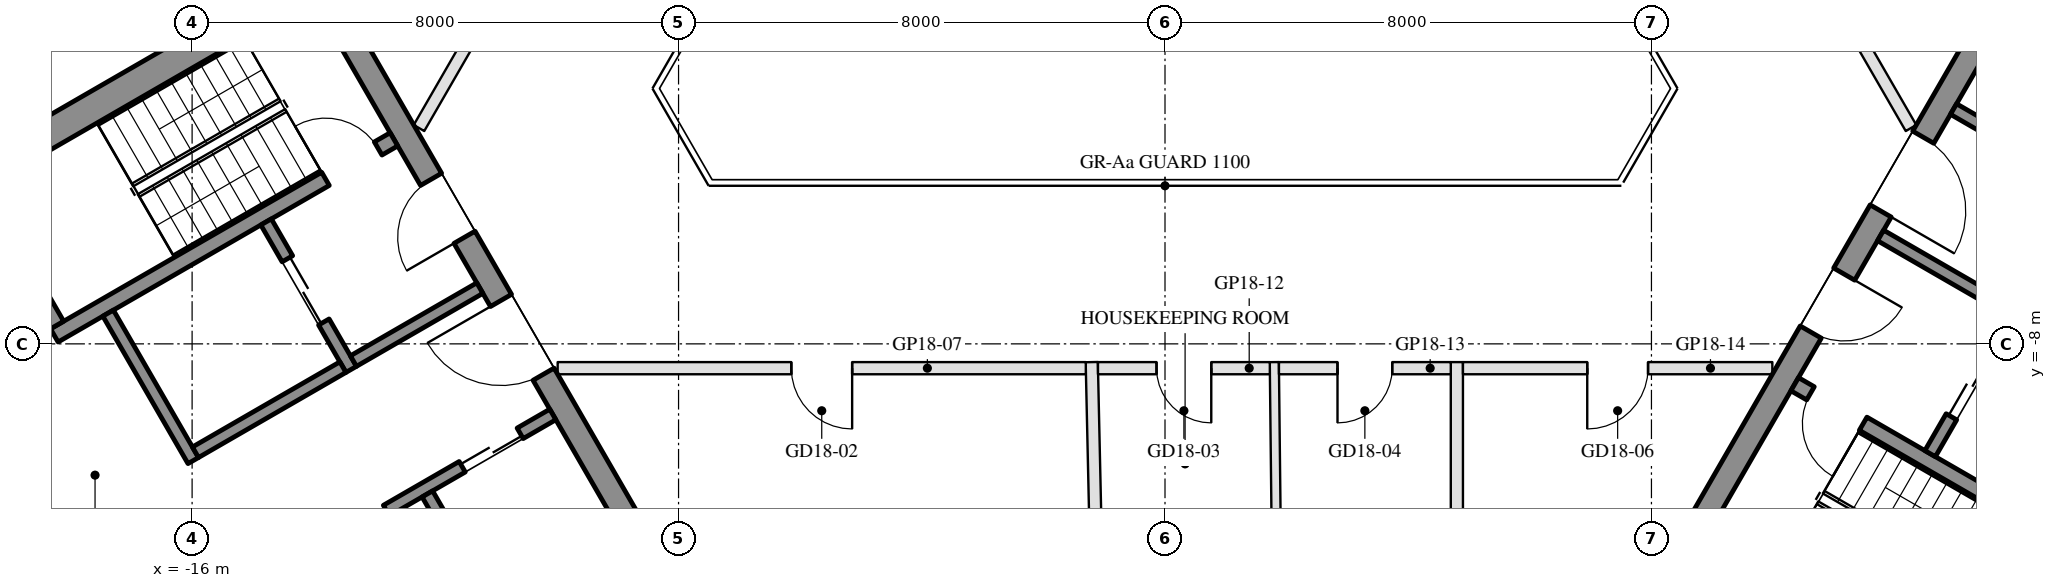
"""IFC4 building model, lengths in metres.
Left out: names, types, materials, properties, quantities, classifications, styles, units other than length and angle.
Written with IfcOpenShell. Run it as: python <this file> out.ifc"""

import sys

from ifc_helpers import new_model, si_unit, direction, frame, frame_2d, origin, place, context, subcontext, project, spatial, rectangle, extrude, element, fill, save


model = new_model("IFC4")
c1 = context("Model", 3, precision=1e-05, world=origin(), true_north=direction((0.0, 1.0)))
c2 = subcontext(c1, "Body", "Model", "MODEL_VIEW")
j1 = project(units=[si_unit("LENGTHUNIT", "METRE"), si_unit("PLANEANGLEUNIT", "RADIAN")], contexts=[c1])
p1 = place(None, origin())
s1 = spatial("IfcSite", under=j1, at=p1, CompositionType="ELEMENT")
p2 = place(p1, origin())
s2 = spatial("IfcBuilding", under=s1, at=p2, CompositionType="ELEMENT")
p3 = place(p2, frame((0.0, 0.0, 198.4)))
s3 = spatial("IfcBuildingStorey", under=s2, at=p3, CompositionType="ELEMENT", Elevation=198.4)
p4 = place(p3, frame((-13.797, -1.903, 0.0), z_axis=(0.0, 0.0, 1.0), x_axis=(-0.866025009528, -0.500000682871, 0.0)))
e1 = element("IfcWall", 1, at=p4, inside=s3, PredefinedType="SHEAR", context=c2, shape_type="SweptSolid", body=[
    extrude(rectangle(XDim=14.837, YDim=0.5, at=frame_2d((7.418, 0.0))), origin(), (0.0, 0.0, 1.0), 3.5),
])
p5 = place(p3, frame((-13.845, -2.22, 0.0), z_axis=(0.0, 0.0, 1.0), x_axis=(0.500004234368, -0.866022959057, 0.0)))
e2 = element("IfcWall", 2, at=p5, inside=s3, PredefinedType="SHEAR", context=c2, shape_type="SweptSolid", body=[
    extrude(rectangle(XDim=10.0, YDim=0.4, at=frame_2d((5.0, 0.0))), origin(), (0.0, 0.0, 1.0), 3.5),
])
p6 = place(p5, frame((3.55, 0.0, 0.0)))
e3 = element("IfcOpeningElement", 3, at=p6, cuts=e2, PredefinedType="OPENING", context=c2, shape_type="SweptSolid", body=[
    extrude(rectangle(XDim=1.1, YDim=2.1, at=frame_2d((0.55, 1.05))), frame((0.0, 0.21, 0.0), z_axis=(0.0, -1.0, 0.0), x_axis=(1.0, 0.0, 0.0)), (0.0, 0.0, 1.0), 0.42),
])
p7 = place(p5, frame((5.85, 0.0, 0.0)))
e4 = element("IfcOpeningElement", 4, at=p7, cuts=e2, PredefinedType="OPENING", context=c2, shape_type="SweptSolid", body=[
    extrude(rectangle(XDim=1.4, YDim=2.1, at=frame_2d((0.7, 1.05))), frame((0.0, 0.21, 0.0), z_axis=(0.0, -1.0, 0.0), x_axis=(1.0, 0.0, 0.0)), (0.0, 0.0, 1.0), 0.42),
])
p8 = place(p3, frame((-12.681, -4.636, 0.0), z_axis=(0.0, 0.0, 1.0), x_axis=(-0.866021702275, -0.500006411147, 0.0)))
e5 = element("IfcWall", 5, at=p8, inside=s3, PredefinedType="SHEAR", context=c2, shape_type="SweptSolid", body=[
    extrude(rectangle(XDim=6.45, YDim=0.25, at=frame_2d((3.225, 0.0))), origin(), (0.0, 0.0, 1.0), 3.5),
])
p9 = place(p8, frame((0.3, 0.0, 0.0)))
e6 = element("IfcOpeningElement", 6, at=p9, cuts=e5, PredefinedType="OPENING", context=c2, shape_type="SweptSolid", body=[
    extrude(rectangle(XDim=1.0, YDim=2.1, at=frame_2d((0.5, 1.05))), frame((0.0, 0.135, 0.0), z_axis=(0.0, -1.0, 0.0), x_axis=(1.0, 0.0, 0.0)), (0.0, 0.0, 1.0), 0.27),
])
p10 = place(p3, frame((-19.496, -5.482, 0.0), z_axis=(0.0, 0.0, 1.0), x_axis=(0.499990435942, -0.866030925526, 0.0)))
e7 = element("IfcWall", 7, at=p10, inside=s3, PredefinedType="SHEAR", context=c2, shape_type="SweptSolid", body=[
    extrude(rectangle(XDim=2.55, YDim=0.25, at=frame_2d((1.275, 0.0))), origin(), (0.0, 0.0, 1.0), 3.5),
])
p11 = place(p3, frame((-17.381, -7.495, 0.0), z_axis=(0.0, 0.0, 1.0), x_axis=(0.500011755427, -0.866018616679, 0.0)))
e8 = element("IfcWall", 8, at=p11, inside=s3, PredefinedType="SHEAR", context=c2, shape_type="SweptSolid", body=[
    extrude(rectangle(XDim=2.8, YDim=0.2, at=frame_2d((1.4, 0.0))), origin(), (0.0, 0.0, 1.0), 3.5),
])
p12 = place(p3, frame((-14.783, -5.995, 0.0), z_axis=(0.0, 0.0, 1.0), x_axis=(0.49994636267, -0.866056369097, 0.0)))
e9 = element("IfcWall", 9, at=p12, inside=s3, PredefinedType="SHEAR", context=c2, shape_type="SweptSolid", body=[
    extrude(rectangle(XDim=2.8, YDim=0.2, at=frame_2d((1.4, 0.0))), origin(), (0.0, 0.0, 1.0), 3.5),
])
p13 = place(p12, frame((0.7, 0.0, 0.0)))
e10 = element("IfcOpeningElement", 10, at=p13, cuts=e9, PredefinedType="OPENING", context=c2, shape_type="SweptSolid", body=[
    extrude(rectangle(XDim=1.2, YDim=2.1, at=frame_2d((0.6, 1.05))), frame((0.0, 0.11, 0.0), z_axis=(0.0, -1.0, 0.0), x_axis=(1.0, 0.0, 0.0)), (0.0, 0.0, 1.0), 0.22),
])
p14 = place(p3, frame((-13.52, -8.383, 0.0), z_axis=(0.0, 0.0, 1.0), x_axis=(-0.866034573852, -0.49998411664, 0.0)))
e11 = element("IfcWall", 11, at=p14, inside=s3, PredefinedType="SHEAR", context=c2, shape_type="SweptSolid", body=[
    extrude(rectangle(XDim=2.8, YDim=0.2, at=frame_2d((1.4, 0.0))), origin(), (0.0, 0.0, 1.0), 3.5),
])
p15 = place(p3, frame((-11.268, -7.083, 0.0), z_axis=(0.0, 0.0, 1.0), x_axis=(-0.866050077142, -0.499957262057, 0.0)))
e12 = element("IfcWall", 12, at=p15, inside=s3, PredefinedType="SHEAR", context=c2, shape_type="SweptSolid", body=[
    extrude(rectangle(XDim=2.4, YDim=0.2, at=frame_2d((1.2, 0.0))), origin(), (0.0, 0.0, 1.0), 3.5),
])
p16 = place(p3, frame((-10.068, -9.162, 0.0), z_axis=(0.0, 0.0, 1.0), x_axis=(-0.866032725843, -0.499987317609, 0.0)))
e13 = element("IfcWall", 13, at=p16, inside=s3, PredefinedType="SHEAR", context=c2, shape_type="SweptSolid", body=[
    extrude(rectangle(XDim=10.16, YDim=0.2, at=frame_2d((5.08, 0.0))), origin(), (0.0, 0.0, 1.0), 3.5),
])
p17 = place(p16, frame((0.62, 0.0, 0.0)))
e14 = element("IfcOpeningElement", 14, at=p17, cuts=e13, PredefinedType="OPENING", context=c2, shape_type="SweptSolid", body=[
    extrude(rectangle(XDim=1.1, YDim=2.1, at=frame_2d((0.55, 1.05))), frame((0.0, 0.11, 0.0), z_axis=(0.0, -1.0, 0.0), x_axis=(1.0, 0.0, 0.0)), (0.0, 0.0, 1.0), 0.22),
])
p18 = place(p16, frame((3.16, 0.0, 0.0)))
e15 = element("IfcOpeningElement", 15, at=p18, cuts=e13, PredefinedType="OPENING", context=c2, shape_type="SweptSolid", body=[
    extrude(rectangle(XDim=1.1, YDim=2.1, at=frame_2d((0.55, 1.05))), frame((0.0, 0.11, 0.0), z_axis=(0.0, -1.0, 0.0), x_axis=(1.0, 0.0, 0.0)), (0.0, 0.0, 1.0), 0.22),
])
p19 = place(p16, frame((5.7, 0.0, 0.0)))
e16 = element("IfcOpeningElement", 16, at=p19, cuts=e13, PredefinedType="OPENING", context=c2, shape_type="SweptSolid", body=[
    extrude(rectangle(XDim=1.1, YDim=2.1, at=frame_2d((0.55, 1.05))), frame((0.0, 0.11, 0.0), z_axis=(0.0, -1.0, 0.0), x_axis=(1.0, 0.0, 0.0)), (0.0, 0.0, 1.0), 0.22),
])
p20 = place(p16, frame((8.24, 0.0, 0.0)))
e17 = element("IfcOpeningElement", 17, at=p20, cuts=e13, PredefinedType="OPENING", context=c2, shape_type="SweptSolid", body=[
    extrude(rectangle(XDim=1.1, YDim=2.1, at=frame_2d((0.55, 1.05))), frame((0.0, 0.11, 0.0), z_axis=(0.0, -1.0, 0.0), x_axis=(1.0, 0.0, 0.0)), (0.0, 0.0, 1.0), 0.22),
])
p21 = place(p3, frame((-12.131, -10.468, 0.0), z_axis=(0.0, 0.0, 1.0), x_axis=(0.499972520799, -0.866041268327, 0.0)))
e18 = element("IfcWall", 18, at=p21, inside=s3, PredefinedType="SHEAR", context=c2, shape_type="SweptSolid", body=[
    extrude(rectangle(XDim=2.0, YDim=0.2, at=frame_2d((1.0, 0.0))), origin(), (0.0, 0.0, 1.0), 3.5),
])
p22 = place(p3, frame((-21.076, -6.395, 0.0), z_axis=(0.0, 0.0, 1.0), x_axis=(0.50001468107, -0.866016927499, 0.0)))
e19 = element("IfcWall", 19, at=p22, inside=s3, PredefinedType="PARTITIONING", context=c2, shape_type="SweptSolid", body=[
    extrude(rectangle(XDim=5.4, YDim=0.2, at=frame_2d((2.7, 0.0))), origin(), (0.0, 0.0, 1.0), 3.5),
])
p23 = place(p22, frame((3.05, 0.0, 0.0)))
e20 = element("IfcOpeningElement", 20, at=p23, cuts=e19, PredefinedType="OPENING", context=c2, shape_type="SweptSolid", body=[
    extrude(rectangle(XDim=0.9, YDim=2.1, at=frame_2d((0.45, 1.05))), frame((0.0, 0.11, 0.0), z_axis=(0.0, -1.0, 0.0), x_axis=(1.0, 0.0, 0.0)), (0.0, 0.0, 1.0), 0.22),
])
p24 = place(p3, frame((8.845, -10.88, 0.0), z_axis=(0.0, 0.0, 1.0), x_axis=(0.500004234368, 0.866022959057, 0.0)))
e21 = element("IfcWall", 21, at=p24, inside=s3, PredefinedType="SHEAR", context=c2, shape_type="SweptSolid", body=[
    extrude(rectangle(XDim=10.0, YDim=0.4, at=frame_2d((5.0, 0.0))), origin(), (0.0, 0.0, 1.0), 3.5),
])
p25 = place(p24, frame((3.55, 0.0, 0.0)))
e22 = element("IfcOpeningElement", 22, at=p25, cuts=e21, PredefinedType="OPENING", context=c2, shape_type="SweptSolid", body=[
    extrude(rectangle(XDim=1.1, YDim=2.1, at=frame_2d((0.55, 1.05))), frame((0.0, 0.21, 0.0), z_axis=(0.0, -1.0, 0.0), x_axis=(1.0, 0.0, 0.0)), (0.0, 0.0, 1.0), 0.42),
])
p26 = place(p24, frame((5.85, 0.0, 0.0)))
e23 = element("IfcOpeningElement", 23, at=p26, cuts=e21, PredefinedType="OPENING", context=c2, shape_type="SweptSolid", body=[
    extrude(rectangle(XDim=1.4, YDim=2.1, at=frame_2d((0.7, 1.05))), frame((0.0, 0.21, 0.0), z_axis=(0.0, -1.0, 0.0), x_axis=(1.0, 0.0, 0.0)), (0.0, 0.0, 1.0), 0.42),
])
p27 = place(p3, frame((10.356, -8.664, 0.0), z_axis=(0.0, 0.0, 1.0), x_axis=(0.866028629588, -0.499994412703, 0.0)))
e24 = element("IfcWall", 24, at=p27, inside=s3, PredefinedType="SHEAR", context=c2, shape_type="SweptSolid", body=[
    extrude(rectangle(XDim=6.45, YDim=0.25, at=frame_2d((3.225, 0.0))), origin(), (0.0, 0.0, 1.0), 3.5),
])
p28 = place(p27, frame((0.3, 0.0, 0.0)))
e25 = element("IfcOpeningElement", 25, at=p28, cuts=e24, PredefinedType="OPENING", context=c2, shape_type="SweptSolid", body=[
    extrude(rectangle(XDim=1.0, YDim=2.1, at=frame_2d((0.5, 1.05))), frame((0.0, 0.135, 0.0), z_axis=(0.0, -1.0, 0.0), x_axis=(1.0, 0.0, 0.0)), (0.0, 0.0, 1.0), 0.27),
])
p29 = place(p3, frame((12.583, -9.805, 0.0), z_axis=(0.0, 0.0, 1.0), x_axis=(0.49994636267, 0.866056369097, 0.0)))
e26 = element("IfcWall", 26, at=p29, inside=s3, PredefinedType="SHEAR", context=c2, shape_type="SweptSolid", body=[
    extrude(rectangle(XDim=2.8, YDim=0.2, at=frame_2d((1.4, 0.0))), origin(), (0.0, 0.0, 1.0), 3.5),
])
p30 = place(p29, frame((0.7, 0.0, 0.0)))
e27 = element("IfcOpeningElement", 27, at=p30, cuts=e26, PredefinedType="OPENING", context=c2, shape_type="SweptSolid", body=[
    extrude(rectangle(XDim=1.2, YDim=2.1, at=frame_2d((0.6, 1.05))), frame((0.0, 0.11, 0.0), z_axis=(0.0, -1.0, 0.0), x_axis=(1.0, 0.0, 0.0)), (0.0, 0.0, 1.0), 0.22),
])
p31 = place(p3, frame((11.768, -6.217, 0.0), z_axis=(0.0, 0.0, 1.0), x_axis=(0.866050077142, -0.499957262057, 0.0)))
e28 = element("IfcWall", 28, at=p31, inside=s3, PredefinedType="SHEAR", context=c2, shape_type="SweptSolid", body=[
    extrude(rectangle(XDim=2.4, YDim=0.2, at=frame_2d((1.2, 0.0))), origin(), (0.0, 0.0, 1.0), 3.5),
])
p32 = place(p3, frame((12.968, -4.138, 0.0), z_axis=(0.0, 0.0, 1.0), x_axis=(0.866028328073, -0.49999493495, 0.0)))
e29 = element("IfcWall", 29, at=p32, inside=s3, PredefinedType="SHEAR", context=c2, shape_type="SweptSolid", body=[
    extrude(rectangle(XDim=10.16, YDim=0.2, at=frame_2d((5.08, 0.0))), origin(), (0.0, 0.0, 1.0), 3.5),
])
p33 = place(p32, frame((1.99, 0.0, 0.0)))
e30 = element("IfcOpeningElement", 30, at=p33, cuts=e29, PredefinedType="OPENING", context=c2, shape_type="SweptSolid", body=[
    extrude(rectangle(XDim=0.9, YDim=2.1, at=frame_2d((0.45, 1.05))), frame((0.0, 0.11, 0.0), z_axis=(0.0, -1.0, 0.0), x_axis=(1.0, 0.0, 0.0)), (0.0, 0.0, 1.0), 0.22),
])
p34 = place(p32, frame((7.07, 0.0, 0.0)))
e31 = element("IfcOpeningElement", 31, at=p34, cuts=e29, PredefinedType="OPENING", context=c2, shape_type="SweptSolid", body=[
    extrude(rectangle(XDim=0.9, YDim=2.1, at=frame_2d((0.45, 1.05))), frame((0.0, 0.11, 0.0), z_axis=(0.0, -1.0, 0.0), x_axis=(1.0, 0.0, 0.0)), (0.0, 0.0, 1.0), 0.22),
])
p35 = place(p3, frame((-0.98, -18.38, 0.0), z_axis=(0.0, 0.0, 1.0), x_axis=(-0.022277513004, 0.999751825412, 0.0)))
e32 = element("IfcWall", 32, at=p35, inside=s3, PredefinedType="PARTITIONING", context=c2, shape_type="SweptSolid", body=[
    extrude(rectangle(XDim=10.082, YDim=0.2, at=frame_2d((5.041, 0.0))), origin(), (0.0, 0.0, 1.0), 3.06),
])
p36 = place(p3, frame((4.8, -19.28, 0.0), z_axis=(0.0, 0.0, 1.0), x_axis=(0.0, 1.0, 0.0)))
e33 = element("IfcWall", 33, at=p36, inside=s3, PredefinedType="PARTITIONING", context=c2, shape_type="SweptSolid", body=[
    extrude(rectangle(XDim=10.98, YDim=0.2, at=frame_2d((5.49, 0.0))), origin(), (0.0, 0.0, 1.0), 3.06),
])
p37 = place(p3, frame((-1.302, -8.4, 0.0), z_axis=(0.0, 0.0, 1.0), x_axis=(-1.0, 0.0, 0.0)))
e34 = element("IfcWall", 34, at=p37, inside=s3, PredefinedType="PARTITIONING", context=c2, shape_type="SweptSolid", body=[
    extrude(rectangle(XDim=8.686, YDim=0.2, at=frame_2d((4.343, 0.0))), origin(), (0.0, 0.0, 1.0), 2.95),
])
p38 = place(p37, frame((3.843, 0.0, 0.0)))
e35 = element("IfcOpeningElement", 35, at=p38, cuts=e34, PredefinedType="OPENING", context=c2, shape_type="SweptSolid", body=[
    extrude(rectangle(XDim=1.0, YDim=2.1, at=frame_2d((0.5, 1.05))), frame((0.0, 0.11, 0.0), z_axis=(0.0, -1.0, 0.0), x_axis=(1.0, 0.0, 0.0)), (0.0, 0.0, 1.0), 0.22),
])
p39 = place(p3, frame((1.92, -19.28, 0.0), z_axis=(0.0, 0.0, 1.0), x_axis=(-0.011116847578, 0.999938205941, 0.0)))
e36 = element("IfcWall", 36, at=p39, inside=s3, PredefinedType="PARTITIONING", context=c2, shape_type="SweptSolid", body=[
    extrude(rectangle(XDim=10.981, YDim=0.15, at=frame_2d((5.49, 0.0))), origin(), (0.0, 0.0, 1.0), 3.06),
])
p40 = place(p3, frame((1.724, -8.4, 0.0), z_axis=(0.0, 0.0, 1.0), x_axis=(-1.0, 0.0, 0.0)))
e37 = element("IfcWall", 37, at=p40, inside=s3, PredefinedType="PARTITIONING", context=c2, shape_type="SweptSolid", body=[
    extrude(rectangle(XDim=2.826, YDim=0.2, at=frame_2d((1.413, 0.0))), origin(), (0.0, 0.0, 1.0), 2.95),
])
p41 = place(p40, frame((0.963, 0.0, 0.0)))
e38 = element("IfcOpeningElement", 38, at=p41, cuts=e37, PredefinedType="OPENING", context=c2, shape_type="SweptSolid", body=[
    extrude(rectangle(XDim=0.9, YDim=2.1, at=frame_2d((0.45, 1.05))), frame((0.0, 0.11, 0.0), z_axis=(0.0, -1.0, 0.0), x_axis=(1.0, 0.0, 0.0)), (0.0, 0.0, 1.0), 0.22),
])
p42 = place(p3, frame((4.7, -8.4, 0.0), z_axis=(0.0, 0.0, 1.0), x_axis=(-1.0, 0.0, 0.0)))
e39 = element("IfcWall", 39, at=p42, inside=s3, PredefinedType="PARTITIONING", context=c2, shape_type="SweptSolid", body=[
    extrude(rectangle(XDim=2.826, YDim=0.2, at=frame_2d((1.413, 0.0))), origin(), (0.0, 0.0, 1.0), 2.95),
])
p43 = place(p42, frame((0.963, 0.0, 0.0)))
e40 = element("IfcOpeningElement", 40, at=p43, cuts=e39, PredefinedType="OPENING", context=c2, shape_type="SweptSolid", body=[
    extrude(rectangle(XDim=0.9, YDim=2.1, at=frame_2d((0.45, 1.05))), frame((0.0, 0.11, 0.0), z_axis=(0.0, -1.0, 0.0), x_axis=(1.0, 0.0, 0.0)), (0.0, 0.0, 1.0), 0.22),
])
p44 = place(p3, frame((9.988, -8.4, 0.0), z_axis=(0.0, 0.0, 1.0), x_axis=(-1.0, 0.0, 0.0)))
e41 = element("IfcWall", 41, at=p44, inside=s3, PredefinedType="PARTITIONING", context=c2, shape_type="SweptSolid", body=[
    extrude(rectangle(XDim=5.088, YDim=0.2, at=frame_2d((2.544, 0.0))), origin(), (0.0, 0.0, 1.0), 2.95),
])
p45 = place(p44, frame((2.044, 0.0, 0.0)))
e42 = element("IfcOpeningElement", 42, at=p45, cuts=e41, PredefinedType="OPENING", context=c2, shape_type="SweptSolid", body=[
    extrude(rectangle(XDim=1.0, YDim=2.1, at=frame_2d((0.5, 1.05))), frame((0.0, 0.11, 0.0), z_axis=(0.0, -1.0, 0.0), x_axis=(1.0, 0.0, 0.0)), (0.0, 0.0, 1.0), 0.22),
])
p46 = place(p3, frame((9.325, 0.649, 0.0), z_axis=(0.0, 0.0, 1.0), x_axis=(0.500032331163, -0.866006736574, 0.0)))
e43 = element("IfcWall", 43, at=p46, inside=s3, PredefinedType="PARTITIONING", context=c2, shape_type="SweptSolid", body=[
    extrude(rectangle(XDim=5.888, YDim=0.2, at=frame_2d((2.944, 0.0))), origin(), (0.0, 0.0, 1.0), 2.95),
])
p47 = place(p46, frame((2.444, 0.0, 0.0)))
e44 = element("IfcOpeningElement", 44, at=p47, cuts=e43, PredefinedType="OPENING", context=c2, shape_type="SweptSolid", body=[
    extrude(rectangle(XDim=1.0, YDim=2.1, at=frame_2d((0.5, 1.05))), frame((0.0, 0.11, 0.0), z_axis=(0.0, -1.0, 0.0), x_axis=(1.0, 0.0, 0.0)), (0.0, 0.0, 1.0), 0.22),
])
p48 = place(p3, frame((-12.269, -4.45, 0.0), z_axis=(0.0, 0.0, 1.0), x_axis=(0.500026884667, 0.866009881359, 0.0)))
e45 = element("IfcWall", 45, at=p48, inside=s3, PredefinedType="PARTITIONING", context=c2, shape_type="SweptSolid", body=[
    extrude(rectangle(XDim=5.484, YDim=0.2, at=frame_2d((2.742, 0.0))), origin(), (0.0, 0.0, 1.0), 2.95),
])
p49 = place(p48, frame((2.242, 0.0, 0.0)))
e46 = element("IfcOpeningElement", 46, at=p49, cuts=e45, PredefinedType="OPENING", context=c2, shape_type="SweptSolid", body=[
    extrude(rectangle(XDim=1.0, YDim=2.1, at=frame_2d((0.5, 1.05))), frame((0.0, 0.11, 0.0), z_axis=(0.0, -1.0, 0.0), x_axis=(1.0, 0.0, 0.0)), (0.0, 0.0, 1.0), 0.22),
])
p50 = place(p13, origin())
e47 = element("IfcDoor", 47, at=p50, inside=s3, OperationType="DOUBLE_DOOR_SLIDING", PredefinedType="DOOR", context=c2, shape_type="SweptSolid", body=[
    extrude(rectangle(XDim=1.2, YDim=2.1, at=frame_2d((0.6, 1.05))), frame((0.0, 0.025, 0.0), z_axis=(0.0, -1.0, 0.0), x_axis=(1.0, 0.0, 0.0)), (0.0, 0.0, 1.0), 0.05),
])
fill(e10, e47)
p51 = place(p17, origin())
e48 = element("IfcDoor", 48, at=p51, inside=s3, OperationType="DOUBLE_DOOR_SLIDING", PredefinedType="DOOR", context=c2, shape_type="SweptSolid", body=[
    extrude(rectangle(XDim=1.1, YDim=2.1, at=frame_2d((0.55, 1.05))), frame((0.0, 0.025, 0.0), z_axis=(0.0, -1.0, 0.0), x_axis=(1.0, 0.0, 0.0)), (0.0, 0.0, 1.0), 0.05),
])
fill(e14, e48)
p52 = place(p6, frame((1.1, 0.0, 0.0), z_axis=(0.0, 0.0, 1.0), x_axis=(-1.0, 0.0, 0.0)))
e49 = element("IfcDoor", 49, at=p52, inside=s3, OperationType="SINGLE_SWING_LEFT", PredefinedType="DOOR", context=c2, shape_type="SweptSolid", body=[
    extrude(rectangle(XDim=1.1, YDim=2.1, at=frame_2d((0.55, 1.05))), frame((0.0, 0.025, 0.0), z_axis=(0.0, -1.0, 0.0), x_axis=(1.0, 0.0, 0.0)), (0.0, 0.0, 1.0), 0.05),
])
fill(e3, e49)
p53 = place(p7, frame((1.4, 0.0, 0.0), z_axis=(0.0, 0.0, 1.0), x_axis=(-1.0, 0.0, 0.0)))
e50 = element("IfcDoor", 50, at=p53, inside=s3, OperationType="DOUBLE_DOOR_SINGLE_SWING", PredefinedType="DOOR", context=c2, shape_type="SweptSolid", body=[
    extrude(rectangle(XDim=1.4, YDim=2.1, at=frame_2d((0.7, 1.05))), frame((0.0, 0.025, 0.0), z_axis=(0.0, -1.0, 0.0), x_axis=(1.0, 0.0, 0.0)), (0.0, 0.0, 1.0), 0.05),
])
fill(e4, e50)
p54 = place(p9, frame((1.0, 0.0, 0.0), z_axis=(0.0, 0.0, 1.0), x_axis=(-1.0, 0.0, 0.0)))
e51 = element("IfcDoor", 51, at=p54, inside=s3, OperationType="SINGLE_SWING_LEFT", PredefinedType="DOOR", context=c2, shape_type="SweptSolid", body=[
    extrude(rectangle(XDim=1.0, YDim=2.1, at=frame_2d((0.5, 1.05))), frame((0.0, 0.025, 0.0), z_axis=(0.0, -1.0, 0.0), x_axis=(1.0, 0.0, 0.0)), (0.0, 0.0, 1.0), 0.05),
])
fill(e6, e51)
p55 = place(p30, origin())
e52 = element("IfcDoor", 52, at=p55, inside=s3, OperationType="DOUBLE_DOOR_SLIDING", PredefinedType="DOOR", context=c2, shape_type="SweptSolid", body=[
    extrude(rectangle(XDim=1.2, YDim=2.1, at=frame_2d((0.6, 1.05))), frame((0.0, 0.025, 0.0), z_axis=(0.0, -1.0, 0.0), x_axis=(1.0, 0.0, 0.0)), (0.0, 0.0, 1.0), 0.05),
])
fill(e27, e52)
p56 = place(p25, frame((1.1, 0.0, 0.0), z_axis=(0.0, 0.0, 1.0), x_axis=(-1.0, 0.0, 0.0)))
e53 = element("IfcDoor", 53, at=p56, inside=s3, OperationType="SINGLE_SWING_LEFT", PredefinedType="DOOR", context=c2, shape_type="SweptSolid", body=[
    extrude(rectangle(XDim=1.1, YDim=2.1, at=frame_2d((0.55, 1.05))), frame((0.0, 0.025, 0.0), z_axis=(0.0, -1.0, 0.0), x_axis=(1.0, 0.0, 0.0)), (0.0, 0.0, 1.0), 0.05),
])
fill(e22, e53)
p57 = place(p26, frame((1.4, 0.0, 0.0), z_axis=(0.0, 0.0, 1.0), x_axis=(-1.0, 0.0, 0.0)))
e54 = element("IfcDoor", 54, at=p57, inside=s3, OperationType="DOUBLE_DOOR_SINGLE_SWING", PredefinedType="DOOR", context=c2, shape_type="SweptSolid", body=[
    extrude(rectangle(XDim=1.4, YDim=2.1, at=frame_2d((0.7, 1.05))), frame((0.0, 0.025, 0.0), z_axis=(0.0, -1.0, 0.0), x_axis=(1.0, 0.0, 0.0)), (0.0, 0.0, 1.0), 0.05),
])
fill(e23, e54)
p58 = place(p28, frame((1.0, 0.0, 0.0), z_axis=(0.0, 0.0, 1.0), x_axis=(-1.0, 0.0, 0.0)))
e55 = element("IfcDoor", 55, at=p58, inside=s3, OperationType="SINGLE_SWING_LEFT", PredefinedType="DOOR", context=c2, shape_type="SweptSolid", body=[
    extrude(rectangle(XDim=1.0, YDim=2.1, at=frame_2d((0.5, 1.05))), frame((0.0, 0.025, 0.0), z_axis=(0.0, -1.0, 0.0), x_axis=(1.0, 0.0, 0.0)), (0.0, 0.0, 1.0), 0.05),
])
fill(e25, e55)
p59 = place(p38, origin())
e56 = element("IfcDoor", 56, at=p59, inside=s3, OperationType="SINGLE_SWING_LEFT", PredefinedType="DOOR", context=c2, shape_type="SweptSolid", body=[
    extrude(rectangle(XDim=1.0, YDim=2.1, at=frame_2d((0.5, 1.05))), frame((0.0, 0.025, 0.0), z_axis=(0.0, -1.0, 0.0), x_axis=(1.0, 0.0, 0.0)), (0.0, 0.0, 1.0), 0.05),
])
fill(e35, e56)
p60 = place(p41, origin())
e57 = element("IfcDoor", 57, at=p60, inside=s3, OperationType="SINGLE_SWING_LEFT", PredefinedType="DOOR", context=c2, shape_type="SweptSolid", body=[
    extrude(rectangle(XDim=0.9, YDim=2.1, at=frame_2d((0.45, 1.05))), frame((0.0, 0.025, 0.0), z_axis=(0.0, -1.0, 0.0), x_axis=(1.0, 0.0, 0.0)), (0.0, 0.0, 1.0), 0.05),
])
fill(e38, e57)
p61 = place(p43, origin())
e58 = element("IfcDoor", 58, at=p61, inside=s3, OperationType="SINGLE_SWING_RIGHT", PredefinedType="DOOR", context=c2, shape_type="SweptSolid", body=[
    extrude(rectangle(XDim=0.9, YDim=2.1, at=frame_2d((0.45, 1.05))), frame((0.0, 0.025, 0.0), z_axis=(0.0, -1.0, 0.0), x_axis=(1.0, 0.0, 0.0)), (0.0, 0.0, 1.0), 0.05),
])
fill(e40, e58)
p62 = place(p45, origin())
e59 = element("IfcDoor", 59, at=p62, inside=s3, OperationType="SINGLE_SWING_RIGHT", PredefinedType="DOOR", context=c2, shape_type="SweptSolid", body=[
    extrude(rectangle(XDim=1.0, YDim=2.1, at=frame_2d((0.5, 1.05))), frame((0.0, 0.025, 0.0), z_axis=(0.0, -1.0, 0.0), x_axis=(1.0, 0.0, 0.0)), (0.0, 0.0, 1.0), 0.05),
])
fill(e42, e59)
save(model, sys.argv[1])
